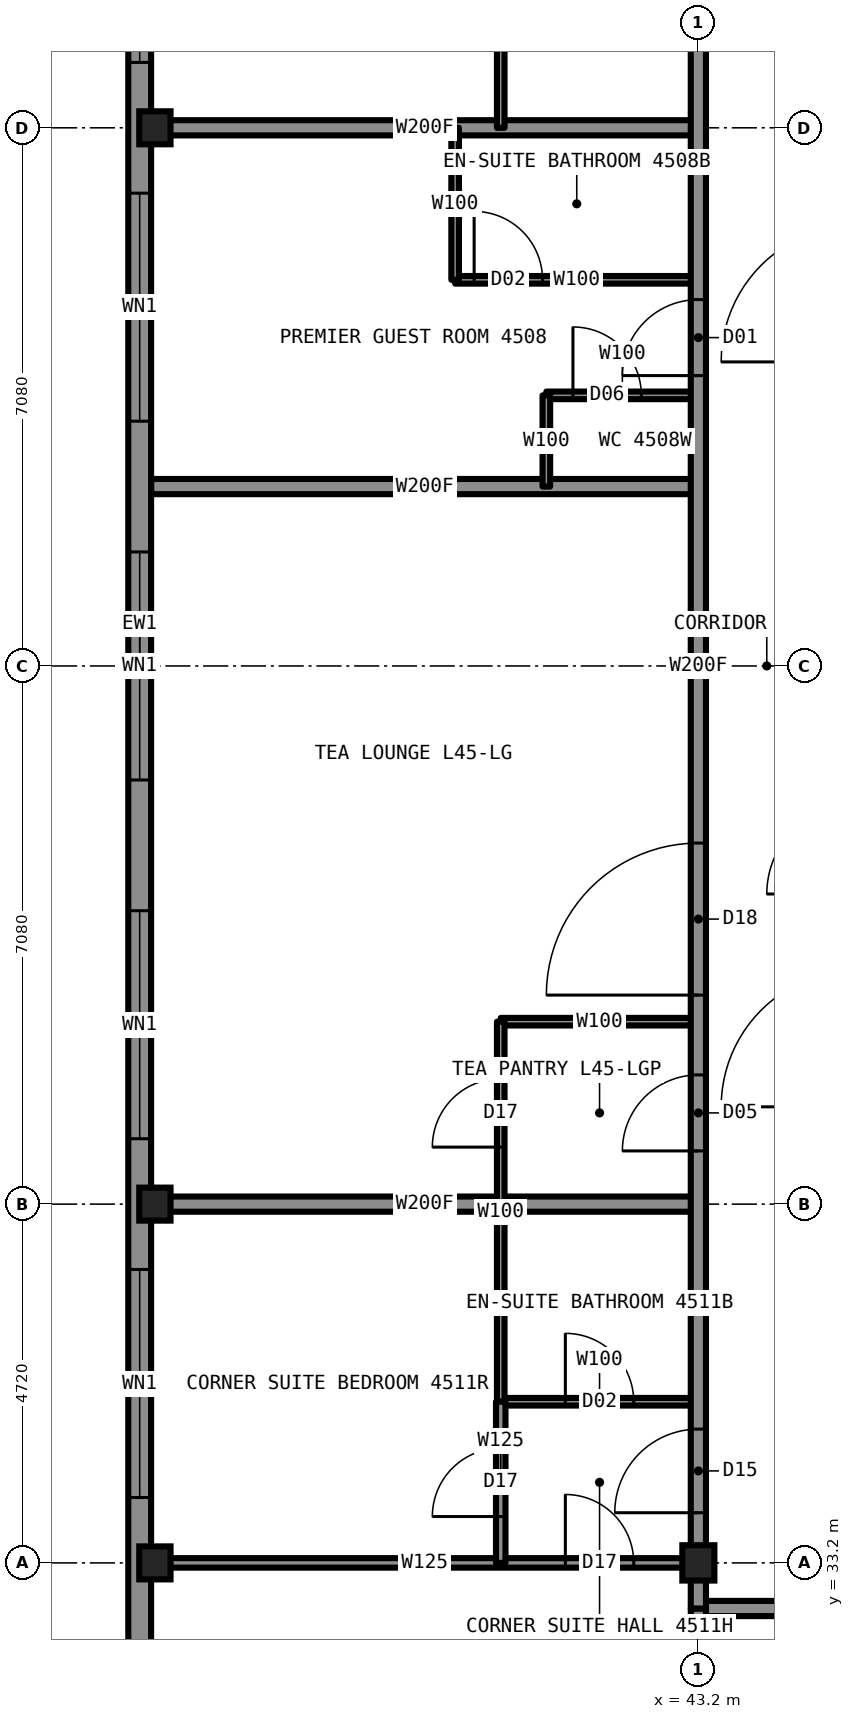
"""IFC4 building model, lengths in metres.
Left out: names, types, materials, properties, quantities, classifications, styles, units other than length and angle.
Written with IfcOpenShell. Run it as: python <this file> out.ifc"""

import sys

from ifc_helpers import new_model, si_unit, direction, frame, frame_2d, origin, origin_2d, place, context, subcontext, project, spatial, rectangle, i_section, extrude, element, fill, save


model = new_model("IFC4")
c1 = context("Model", 3, precision=1e-05, world=origin(), true_north=direction((0.0, 1.0)))
c2 = subcontext(c1, "Body", "Model", "MODEL_VIEW")
j1 = project(units=[si_unit("LENGTHUNIT", "METRE"), si_unit("PLANEANGLEUNIT", "RADIAN")], contexts=[c1])
p1 = place(None, origin())
s1 = spatial("IfcSite", under=j1, at=p1, CompositionType="ELEMENT")
p2 = place(p1, origin())
s2 = spatial("IfcBuilding", under=s1, at=p2, CompositionType="ELEMENT")
p3 = place(p2, frame((0.0, 0.0, 161.8)))
s3 = spatial("IfcBuildingStorey", under=s2, at=p3, CompositionType="ELEMENT", Elevation=161.8)
for number, where, z_axis, x_axis in (
    (1, (36.05, 33.2, 0.0), (0.0, 0.0, 1.0), (1.0, 0.0, 0.0)),
    (2, (36.05, 37.92, 0.0), (0.0, 0.0, 1.0), (1.0, 0.0, 0.0)),
    (3, (36.05, 52.08, 0.0), (0.0, 0.0, 1.0), (1.0, 0.0, 0.0)),
):
    element("IfcColumn", number, at=place(p3, frame(where, z_axis=z_axis, x_axis=x_axis)), inside=s3, PredefinedType="COLUMN", context=c2, shape_type="SweptSolid", body=[
        extrude(i_section(OverallWidth=0.442, OverallDepth=0.531, WebThickness=0.066, FlangeThickness=0.106, at=origin_2d()), origin(), (0.0, 0.0, 1.0), 3.5),
    ])
p4 = place(p3, frame((43.2, 33.2, 0.0), z_axis=(0.0, 0.0, 1.0), x_axis=(1.0, 0.0, 0.0)))
e4 = element("IfcColumn", 4, at=p4, inside=s3, PredefinedType="COLUMN", context=c2, shape_type="SweptSolid", body=[
    extrude(i_section(OverallWidth=0.422, OverallDepth=0.465, WebThickness=0.045, FlangeThickness=0.073, at=origin_2d()), origin(), (0.0, 0.0, 1.0), 3.5),
])
p5 = place(p3, frame((36.0, 33.2, 0.0), z_axis=(0.0, 0.0, 1.0), x_axis=(1.0, 0.0, 0.0)))
e5 = element("IfcWall", 5, at=p5, inside=s3, PredefinedType="PARTITIONING", context=c2, shape_type="SweptSolid", body=[
    extrude(rectangle(XDim=7.2, YDim=0.125, at=frame_2d((3.6, 0.0))), origin(), (0.0, 0.0, 1.0), 2.573),
])
p6 = place(p5, frame((5.45, 0.0, 0.0)))
e6 = element("IfcOpeningElement", 6, at=p6, cuts=e5, PredefinedType="OPENING", context=c2, shape_type="SweptSolid", body=[
    extrude(rectangle(XDim=0.9, YDim=2.2, at=frame_2d((0.45, 1.1))), frame((0.0, 0.073, 0.0), z_axis=(0.0, -1.0, 0.0), x_axis=(1.0, 0.0, 0.0)), (0.0, 0.0, 1.0), 0.145),
])
p7 = place(p3, frame((43.2, 32.6, 0.0), z_axis=(0.0, 0.0, 1.0), x_axis=(1.0, 0.0, 0.0)))
e7 = element("IfcWall", 7, at=p7, inside=s3, PredefinedType="PARTITIONING", context=c2, shape_type="SweptSolid", body=[
    extrude(rectangle(XDim=23.6, YDim=0.2, at=frame_2d((11.8, 0.0))), origin(), (0.0, 0.0, 1.0), 3.33),
])
p8 = place(p7, frame((3.0, 0.0, 0.0)))
e8 = element("IfcOpeningElement", 8, at=p8, cuts=e7, PredefinedType="OPENING", context=c2, shape_type="SweptSolid", body=[
    extrude(rectangle(XDim=1.0, YDim=2.2, at=frame_2d((0.5, 1.1))), frame((0.0, 0.11, 0.0), z_axis=(0.0, -1.0, 0.0), x_axis=(1.0, 0.0, 0.0)), (0.0, 0.0, 1.0), 0.22),
])
p9 = place(p7, frame((11.7, 0.0, 0.0)))
e9 = element("IfcOpeningElement", 9, at=p9, cuts=e7, PredefinedType="OPENING", context=c2, shape_type="SweptSolid", body=[
    extrude(rectangle(XDim=1.0, YDim=2.2, at=frame_2d((0.5, 1.1))), frame((0.0, 0.11, 0.0), z_axis=(0.0, -1.0, 0.0), x_axis=(1.0, 0.0, 0.0)), (0.0, 0.0, 1.0), 0.22),
])
p10 = place(p7, frame((17.16, 0.0, 0.0)))
e10 = element("IfcOpeningElement", 10, at=p10, cuts=e7, PredefinedType="OPENING", context=c2, shape_type="SweptSolid", body=[
    extrude(rectangle(XDim=1.0, YDim=2.2, at=frame_2d((0.5, 1.1))), frame((0.0, 0.11, 0.0), z_axis=(0.0, -1.0, 0.0), x_axis=(1.0, 0.0, 0.0)), (0.0, 0.0, 1.0), 0.22),
])
p11 = place(p3, frame((40.6, 40.32, 0.0), z_axis=(0.0, 0.0, 1.0), x_axis=(1.0, 0.0, 0.0)))
e11 = element("IfcWall", 11, at=p11, inside=s3, PredefinedType="PARTITIONING", context=c2, shape_type="SweptSolid", body=[
    extrude(rectangle(XDim=2.6, YDim=0.1, at=frame_2d((1.3, 0.0))), origin(), (0.0, 0.0, 1.0), 2.73),
])
p12 = place(p3, frame((36.0, 37.92, 0.0), z_axis=(0.0, 0.0, 1.0), x_axis=(1.0, 0.0, 0.0)))
e12 = element("IfcWall", 12, at=p12, inside=s3, PredefinedType="PARTITIONING", context=c2, shape_type="SweptSolid", body=[
    extrude(rectangle(XDim=7.2, YDim=0.2, at=frame_2d((3.6, 0.0))), origin(), (0.0, 0.0, 1.0), 2.573),
])
p13 = place(p3, frame((40.6, 35.32, 0.0), z_axis=(0.0, 0.0, 1.0), x_axis=(1.0, 0.0, 0.0)))
e13 = element("IfcWall", 13, at=p13, inside=s3, PredefinedType="PARTITIONING", context=c2, shape_type="SweptSolid", body=[
    extrude(rectangle(XDim=2.6, YDim=0.1, at=frame_2d((1.3, 0.0))), origin(), (0.0, 0.0, 1.0), 3.33),
])
p14 = place(p13, frame((0.85, 0.0, 0.0)))
e14 = element("IfcOpeningElement", 14, at=p14, cuts=e13, PredefinedType="OPENING", context=c2, shape_type="SweptSolid", body=[
    extrude(rectangle(XDim=0.9, YDim=2.1, at=frame_2d((0.45, 1.05))), frame((0.0, 0.06, 0.0), z_axis=(0.0, -1.0, 0.0), x_axis=(1.0, 0.0, 0.0)), (0.0, 0.0, 1.0), 0.12),
])
p15 = place(p3, frame((36.0, 47.36, 0.0), z_axis=(0.0, 0.0, 1.0), x_axis=(1.0, 0.0, 0.0)))
e15 = element("IfcWall", 15, at=p15, inside=s3, PredefinedType="PARTITIONING", context=c2, shape_type="SweptSolid", body=[
    extrude(rectangle(XDim=7.2, YDim=0.2, at=frame_2d((3.6, 0.0))), origin(), (0.0, 0.0, 1.0), 2.73),
])
p16 = place(p3, frame((41.2, 48.56, 0.0), z_axis=(0.0, 0.0, 1.0), x_axis=(1.0, 0.0, 0.0)))
e16 = element("IfcWall", 16, at=p16, inside=s3, PredefinedType="PARTITIONING", context=c2, shape_type="SweptSolid", body=[
    extrude(rectangle(XDim=2.0, YDim=0.1, at=frame_2d((1.0, 0.0))), origin(), (0.0, 0.0, 1.0), 3.33),
])
p17 = place(p16, frame((0.35, 0.0, 0.0)))
e17 = element("IfcOpeningElement", 17, at=p17, cuts=e16, PredefinedType="OPENING", context=c2, shape_type="SweptSolid", body=[
    extrude(rectangle(XDim=0.9, YDim=2.1, at=frame_2d((0.45, 1.05))), frame((0.0, 0.06, 0.0), z_axis=(0.0, -1.0, 0.0), x_axis=(1.0, 0.0, 0.0)), (0.0, 0.0, 1.0), 0.12),
])
p18 = place(p3, frame((40.0, 50.08, 0.0), z_axis=(0.0, 0.0, 1.0), x_axis=(1.0, 0.0, 0.0)))
e18 = element("IfcWall", 18, at=p18, inside=s3, PredefinedType="PARTITIONING", context=c2, shape_type="SweptSolid", body=[
    extrude(rectangle(XDim=3.2, YDim=0.1, at=frame_2d((1.6, 0.0))), origin(), (0.0, 0.0, 1.0), 3.33),
])
p19 = place(p18, frame((0.25, 0.0, 0.0)))
e19 = element("IfcOpeningElement", 19, at=p19, cuts=e18, PredefinedType="OPENING", context=c2, shape_type="SweptSolid", body=[
    extrude(rectangle(XDim=0.9, YDim=2.1, at=frame_2d((0.45, 1.05))), frame((0.0, 0.06, 0.0), z_axis=(0.0, -1.0, 0.0), x_axis=(1.0, 0.0, 0.0)), (0.0, 0.0, 1.0), 0.12),
])
p20 = place(p3, frame((36.0, 52.08, 0.0), z_axis=(0.0, 0.0, 1.0), x_axis=(1.0, 0.0, 0.0)))
e20 = element("IfcWall", 20, at=p20, inside=s3, PredefinedType="PARTITIONING", context=c2, shape_type="SweptSolid", body=[
    extrude(rectangle(XDim=7.2, YDim=0.2, at=frame_2d((3.6, 0.0))), origin(), (0.0, 0.0, 1.0), 2.573),
])
p21 = place(p3, frame((43.2, 33.22, 0.0), z_axis=(0.0, 0.0, 1.0), x_axis=(0.0, 1.0, 0.0)))
e21 = element("IfcWall", 21, at=p21, inside=s3, PredefinedType="PARTITIONING", context=c2, shape_type="SweptSolid", body=[
    extrude(rectangle(XDim=23.56, YDim=0.2, at=frame_2d((11.78, 0.0))), origin(), (0.0, 0.0, 1.0), 3.33),
])
p22 = place(p21, frame((15.6, 0.0, 0.0)))
e22 = element("IfcOpeningElement", 22, at=p22, cuts=e21, PredefinedType="OPENING", context=c2, shape_type="SweptSolid", body=[
    extrude(rectangle(XDim=1.0, YDim=2.2, at=frame_2d((0.5, 1.1))), frame((0.0, 0.11, 0.0), z_axis=(0.0, -1.0, 0.0), x_axis=(1.0, 0.0, 0.0)), (0.0, 0.0, 1.0), 0.22),
])
p23 = place(p21, frame((22.03, 0.0, 0.0)))
e23 = element("IfcOpeningElement", 23, at=p23, cuts=e21, PredefinedType="OPENING", context=c2, shape_type="SweptSolid", body=[
    extrude(rectangle(XDim=1.1, YDim=2.2, at=frame_2d((0.55, 1.1))), frame((0.0, 0.11, 0.0), z_axis=(0.0, -1.0, 0.0), x_axis=(1.0, 0.0, 0.0)), (0.0, 0.0, 1.0), 0.22),
])
p24 = place(p21, frame((0.64, 0.0, 0.0)))
e24 = element("IfcOpeningElement", 24, at=p24, cuts=e21, PredefinedType="OPENING", context=c2, shape_type="SweptSolid", body=[
    extrude(rectangle(XDim=1.1, YDim=2.2, at=frame_2d((0.55, 1.1))), frame((0.0, 0.11, 0.0), z_axis=(0.0, -1.0, 0.0), x_axis=(1.0, 0.0, 0.0)), (0.0, 0.0, 1.0), 0.22),
])
p25 = place(p21, frame((7.45, 0.0, 0.0)))
e25 = element("IfcOpeningElement", 25, at=p25, cuts=e21, PredefinedType="OPENING", context=c2, shape_type="SweptSolid", body=[
    extrude(rectangle(XDim=2.0, YDim=2.4, at=frame_2d((1.0, 1.2))), frame((0.0, 0.11, 0.0), z_axis=(0.0, -1.0, 0.0), x_axis=(1.0, 0.0, 0.0)), (0.0, 0.0, 1.0), 0.22),
])
p26 = place(p21, frame((5.4, 0.0, 0.0)))
e26 = element("IfcOpeningElement", 26, at=p26, cuts=e21, PredefinedType="OPENING", context=c2, shape_type="SweptSolid", body=[
    extrude(rectangle(XDim=1.0, YDim=2.1, at=frame_2d((0.5, 1.05))), frame((0.0, 0.11, 0.0), z_axis=(0.0, -1.0, 0.0), x_axis=(1.0, 0.0, 0.0)), (0.0, 0.0, 1.0), 0.22),
])
p27 = place(p3, frame((43.2, 26.0, 0.0), z_axis=(0.0, 0.0, 1.0), x_axis=(0.0, 1.0, 0.0)))
e27 = element("IfcWall", 27, at=p27, inside=s3, PredefinedType="PARTITIONING", context=c2, shape_type="SweptSolid", body=[
    extrude(rectangle(XDim=6.6, YDim=0.2, at=frame_2d((3.3, 0.0))), origin(), (0.0, 0.0, 1.0), 2.573),
])
p28 = place(p3, frame((41.2, 47.36, 0.0), z_axis=(0.0, 0.0, 1.0), x_axis=(0.0, 1.0, 0.0)))
e28 = element("IfcWall", 28, at=p28, inside=s3, PredefinedType="PARTITIONING", context=c2, shape_type="SweptSolid", body=[
    extrude(rectangle(XDim=1.2, YDim=0.1, at=frame_2d((0.6, 0.0))), origin(), (0.0, 0.0, 1.0), 3.33),
])
p29 = place(p3, frame((40.6, 35.32, 0.0), z_axis=(0.0, 0.0, 1.0), x_axis=(0.0, 1.0, 0.0)))
e29 = element("IfcWall", 29, at=p29, inside=s3, PredefinedType="PARTITIONING", context=c2, shape_type="SweptSolid", body=[
    extrude(rectangle(XDim=5.0, YDim=0.1, at=frame_2d((2.5, 0.0))), origin(), (0.0, 0.0, 1.0), 3.33),
])
p30 = place(p29, frame((3.35, 0.0, 0.0)))
e30 = element("IfcOpeningElement", 30, at=p30, cuts=e29, PredefinedType="OPENING", context=c2, shape_type="SweptSolid", body=[
    extrude(rectangle(XDim=0.9, YDim=2.2, at=frame_2d((0.45, 1.1))), frame((0.0, 0.06, 0.0), z_axis=(0.0, -1.0, 0.0), x_axis=(1.0, 0.0, 0.0)), (0.0, 0.0, 1.0), 0.12),
])
p31 = place(p3, frame((40.6, 52.08, 0.0), z_axis=(0.0, 0.0, 1.0), x_axis=(0.0, 1.0, 0.0)))
e31 = element("IfcWall", 31, at=p31, inside=s3, PredefinedType="PARTITIONING", context=c2, shape_type="SweptSolid", body=[
    extrude(rectangle(XDim=2.6, YDim=0.1, at=frame_2d((1.3, 0.0))), origin(), (0.0, 0.0, 1.0), 3.33),
])
p32 = place(p3, frame((40.6, 33.2, 0.0), z_axis=(0.0, 0.0, 1.0), x_axis=(0.0, 1.0, 0.0)))
e32 = element("IfcWall", 32, at=p32, inside=s3, PredefinedType="PARTITIONING", context=c2, shape_type="SweptSolid", body=[
    extrude(rectangle(XDim=2.12, YDim=0.125, at=frame_2d((1.06, 0.0))), origin(), (0.0, 0.0, 1.0), 3.33),
])
p33 = place(p32, frame((0.61, 0.0, 0.0)))
e33 = element("IfcOpeningElement", 33, at=p33, cuts=e32, PredefinedType="OPENING", context=c2, shape_type="SweptSolid", body=[
    extrude(rectangle(XDim=0.9, YDim=2.2, at=frame_2d((0.45, 1.1))), frame((0.0, 0.073, 0.0), z_axis=(0.0, -1.0, 0.0), x_axis=(1.0, 0.0, 0.0)), (0.0, 0.0, 1.0), 0.145),
])
p34 = place(p3, frame((40.0, 50.08, 0.0), z_axis=(0.0, 0.0, 1.0), x_axis=(0.0, 1.0, 0.0)))
e34 = element("IfcWall", 34, at=p34, inside=s3, PredefinedType="PARTITIONING", context=c2, shape_type="SweptSolid", body=[
    extrude(rectangle(XDim=2.0, YDim=0.1, at=frame_2d((1.0, 0.0))), origin(), (0.0, 0.0, 1.0), 3.33),
])
p35 = place(p3, frame((35.85, 58.8, 0.0), z_axis=(0.0, 0.0, 1.0), x_axis=(0.0, -1.0, 0.0)))
e35 = element("IfcWall", 35, at=p35, inside=s3, PredefinedType="SOLIDWALL", context=c2, shape_type="SweptSolid", body=[
    extrude(rectangle(XDim=27.6, YDim=0.3, at=frame_2d((13.8, 0.0))), origin(), (0.0, 0.0, 1.0), 2.83),
])
p36 = place(p35, frame((2.86, 0.0, 0.3)))
e36 = element("IfcOpeningElement", 36, at=p36, cuts=e35, PredefinedType="OPENING", context=c2, shape_type="SweptSolid", body=[
    extrude(rectangle(XDim=3.0, YDim=2.0, at=frame_2d((1.5, 1.0))), frame((0.0, 0.16, 0.0), z_axis=(0.0, -1.0, 0.0), x_axis=(1.0, 0.0, 0.0)), (0.0, 0.0, 1.0), 0.32),
])
p37 = place(p35, frame((7.58, 0.0, 0.3)))
e37 = element("IfcOpeningElement", 37, at=p37, cuts=e35, PredefinedType="OPENING", context=c2, shape_type="SweptSolid", body=[
    extrude(rectangle(XDim=3.0, YDim=2.0, at=frame_2d((1.5, 1.0))), frame((0.0, 0.16, 0.0), z_axis=(0.0, -1.0, 0.0), x_axis=(1.0, 0.0, 0.0)), (0.0, 0.0, 1.0), 0.32),
])
p38 = place(p35, frame((12.3, 0.0, 0.3)))
e38 = element("IfcOpeningElement", 38, at=p38, cuts=e35, PredefinedType="OPENING", context=c2, shape_type="SweptSolid", body=[
    extrude(rectangle(XDim=3.0, YDim=2.0, at=frame_2d((1.5, 1.0))), frame((0.0, 0.16, 0.0), z_axis=(0.0, -1.0, 0.0), x_axis=(1.0, 0.0, 0.0)), (0.0, 0.0, 1.0), 0.32),
])
p39 = place(p35, frame((17.02, 0.0, 0.3)))
e39 = element("IfcOpeningElement", 39, at=p39, cuts=e35, PredefinedType="OPENING", context=c2, shape_type="SweptSolid", body=[
    extrude(rectangle(XDim=3.0, YDim=2.0, at=frame_2d((1.5, 1.0))), frame((0.0, 0.16, 0.0), z_axis=(0.0, -1.0, 0.0), x_axis=(1.0, 0.0, 0.0)), (0.0, 0.0, 1.0), 0.32),
])
p40 = place(p35, frame((21.74, 0.0, 0.3)))
e40 = element("IfcOpeningElement", 40, at=p40, cuts=e35, PredefinedType="OPENING", context=c2, shape_type="SweptSolid", body=[
    extrude(rectangle(XDim=3.0, YDim=2.0, at=frame_2d((1.5, 1.0))), frame((0.0, 0.16, 0.0), z_axis=(0.0, -1.0, 0.0), x_axis=(1.0, 0.0, 0.0)), (0.0, 0.0, 1.0), 0.32),
])
p41 = place(p3, frame((43.2, 32.6, 0.0), z_axis=(0.0, 0.0, 1.0), x_axis=(0.0, 1.0, 0.0)))
e41 = element("IfcWall", 41, at=p41, inside=s3, PredefinedType="PARTITIONING", context=c2, shape_type="SweptSolid", body=[
    extrude(rectangle(XDim=0.62, YDim=0.2, at=frame_2d((0.31, 0.0))), origin(), (0.0, 0.0, 1.0), 2.573),
])
p42 = place(p22, origin())
e42 = element("IfcDoor", 42, at=p42, inside=s3, OperationType="SINGLE_SWING_LEFT", PredefinedType="DOOR", context=c2, shape_type="SweptSolid", body=[
    extrude(rectangle(XDim=1.0, YDim=2.2, at=frame_2d((0.5, 1.1))), frame((0.0, 0.025, 0.0), z_axis=(0.0, -1.0, 0.0), x_axis=(1.0, 0.0, 0.0)), (0.0, 0.0, 1.0), 0.05),
])
fill(e22, e42)
p43 = place(p19, origin())
e43 = element("IfcDoor", 43, at=p43, inside=s3, OperationType="SINGLE_SWING_RIGHT", PredefinedType="DOOR", context=c2, shape_type="SweptSolid", body=[
    extrude(rectangle(XDim=0.9, YDim=2.1, at=frame_2d((0.45, 1.05))), frame((0.0, 0.025, 0.0), z_axis=(0.0, -1.0, 0.0), x_axis=(1.0, 0.0, 0.0)), (0.0, 0.0, 1.0), 0.05),
])
fill(e19, e43)
p44 = place(p17, origin())
e44 = element("IfcDoor", 44, at=p44, inside=s3, OperationType="SINGLE_SWING_LEFT", PredefinedType="DOOR", context=c2, shape_type="SweptSolid", body=[
    extrude(rectangle(XDim=0.9, YDim=2.1, at=frame_2d((0.45, 1.05))), frame((0.0, 0.025, 0.0), z_axis=(0.0, -1.0, 0.0), x_axis=(1.0, 0.0, 0.0)), (0.0, 0.0, 1.0), 0.05),
])
fill(e17, e44)
p45 = place(p6, origin())
e45 = element("IfcDoor", 45, at=p45, inside=s3, OperationType="SINGLE_SWING_LEFT", PredefinedType="DOOR", context=c2, shape_type="SweptSolid", body=[
    extrude(rectangle(XDim=0.9, YDim=2.2, at=frame_2d((0.45, 1.1))), frame((0.0, 0.025, 0.0), z_axis=(0.0, -1.0, 0.0), x_axis=(1.0, 0.0, 0.0)), (0.0, 0.0, 1.0), 0.05),
])
fill(e6, e45)
p46 = place(p14, origin())
e46 = element("IfcDoor", 46, at=p46, inside=s3, OperationType="SINGLE_SWING_RIGHT", PredefinedType="DOOR", context=c2, shape_type="SweptSolid", body=[
    extrude(rectangle(XDim=0.9, YDim=2.1, at=frame_2d((0.45, 1.05))), frame((0.0, 0.025, 0.0), z_axis=(0.0, -1.0, 0.0), x_axis=(1.0, 0.0, 0.0)), (0.0, 0.0, 1.0), 0.05),
])
fill(e14, e46)
p47 = place(p24, origin())
e47 = element("IfcDoor", 47, at=p47, inside=s3, OperationType="SINGLE_SWING_LEFT", PredefinedType="DOOR", context=c2, shape_type="SweptSolid", body=[
    extrude(rectangle(XDim=1.1, YDim=2.2, at=frame_2d((0.55, 1.1))), frame((0.0, 0.025, 0.0), z_axis=(0.0, -1.0, 0.0), x_axis=(1.0, 0.0, 0.0)), (0.0, 0.0, 1.0), 0.05),
])
fill(e24, e47)
p48 = place(p33, origin())
e48 = element("IfcDoor", 48, at=p48, inside=s3, OperationType="SINGLE_SWING_LEFT", PredefinedType="DOOR", context=c2, shape_type="SweptSolid", body=[
    extrude(rectangle(XDim=0.9, YDim=2.2, at=frame_2d((0.45, 1.1))), frame((0.0, 0.025, 0.0), z_axis=(0.0, -1.0, 0.0), x_axis=(1.0, 0.0, 0.0)), (0.0, 0.0, 1.0), 0.05),
])
fill(e33, e48)
p49 = place(p25, origin())
e49 = element("IfcDoor", 49, at=p49, inside=s3, OperationType="DOUBLE_DOOR_SINGLE_SWING", PredefinedType="DOOR", context=c2, shape_type="SweptSolid", body=[
    extrude(rectangle(XDim=2.0, YDim=2.4, at=frame_2d((1.0, 1.2))), frame((0.0, 0.025, 0.0), z_axis=(0.0, -1.0, 0.0), x_axis=(1.0, 0.0, 0.0)), (0.0, 0.0, 1.0), 0.05),
])
fill(e25, e49)
p50 = place(p30, origin())
e50 = element("IfcDoor", 50, at=p50, inside=s3, OperationType="SINGLE_SWING_LEFT", PredefinedType="DOOR", context=c2, shape_type="SweptSolid", body=[
    extrude(rectangle(XDim=0.9, YDim=2.2, at=frame_2d((0.45, 1.1))), frame((0.0, 0.025, 0.0), z_axis=(0.0, -1.0, 0.0), x_axis=(1.0, 0.0, 0.0)), (0.0, 0.0, 1.0), 0.05),
])
fill(e30, e50)
p51 = place(p26, origin())
e51 = element("IfcDoor", 51, at=p51, inside=s3, OperationType="SINGLE_SWING_LEFT", PredefinedType="DOOR", context=c2, shape_type="SweptSolid", body=[
    extrude(rectangle(XDim=1.0, YDim=2.1, at=frame_2d((0.5, 1.05))), frame((0.0, 0.025, 0.0), z_axis=(0.0, -1.0, 0.0), x_axis=(1.0, 0.0, 0.0)), (0.0, 0.0, 1.0), 0.05),
])
fill(e26, e51)
p52 = place(p36, origin())
e52 = element("IfcWindow", 52, at=p52, inside=s3, PartitioningType="SINGLE_PANEL", PredefinedType="WINDOW", context=c2, shape_type="SweptSolid", body=[
    extrude(rectangle(XDim=3.0, YDim=2.0, at=frame_2d((1.5, 1.0))), frame((0.0, 0.13, 0.0), z_axis=(0.0, -1.0, 0.0), x_axis=(1.0, 0.0, 0.0)), (0.0, 0.0, 1.0), 0.06),
])
fill(e36, e52)
p53 = place(p37, origin())
e53 = element("IfcWindow", 53, at=p53, inside=s3, PartitioningType="SINGLE_PANEL", PredefinedType="WINDOW", context=c2, shape_type="SweptSolid", body=[
    extrude(rectangle(XDim=3.0, YDim=2.0, at=frame_2d((1.5, 1.0))), frame((0.0, 0.13, 0.0), z_axis=(0.0, -1.0, 0.0), x_axis=(1.0, 0.0, 0.0)), (0.0, 0.0, 1.0), 0.06),
])
fill(e37, e53)
p54 = place(p38, origin())
e54 = element("IfcWindow", 54, at=p54, inside=s3, PartitioningType="SINGLE_PANEL", PredefinedType="WINDOW", context=c2, shape_type="SweptSolid", body=[
    extrude(rectangle(XDim=3.0, YDim=2.0, at=frame_2d((1.5, 1.0))), frame((0.0, 0.13, 0.0), z_axis=(0.0, -1.0, 0.0), x_axis=(1.0, 0.0, 0.0)), (0.0, 0.0, 1.0), 0.06),
])
fill(e38, e54)
p55 = place(p39, origin())
e55 = element("IfcWindow", 55, at=p55, inside=s3, PartitioningType="SINGLE_PANEL", PredefinedType="WINDOW", context=c2, shape_type="SweptSolid", body=[
    extrude(rectangle(XDim=3.0, YDim=2.0, at=frame_2d((1.5, 1.0))), frame((0.0, 0.13, 0.0), z_axis=(0.0, -1.0, 0.0), x_axis=(1.0, 0.0, 0.0)), (0.0, 0.0, 1.0), 0.06),
])
fill(e39, e55)
p56 = place(p40, origin())
e56 = element("IfcWindow", 56, at=p56, inside=s3, PartitioningType="SINGLE_PANEL", PredefinedType="WINDOW", context=c2, shape_type="SweptSolid", body=[
    extrude(rectangle(XDim=3.0, YDim=2.0, at=frame_2d((1.5, 1.0))), frame((0.0, 0.13, 0.0), z_axis=(0.0, -1.0, 0.0), x_axis=(1.0, 0.0, 0.0)), (0.0, 0.0, 1.0), 0.06),
])
fill(e40, e56)
save(model, sys.argv[1])
